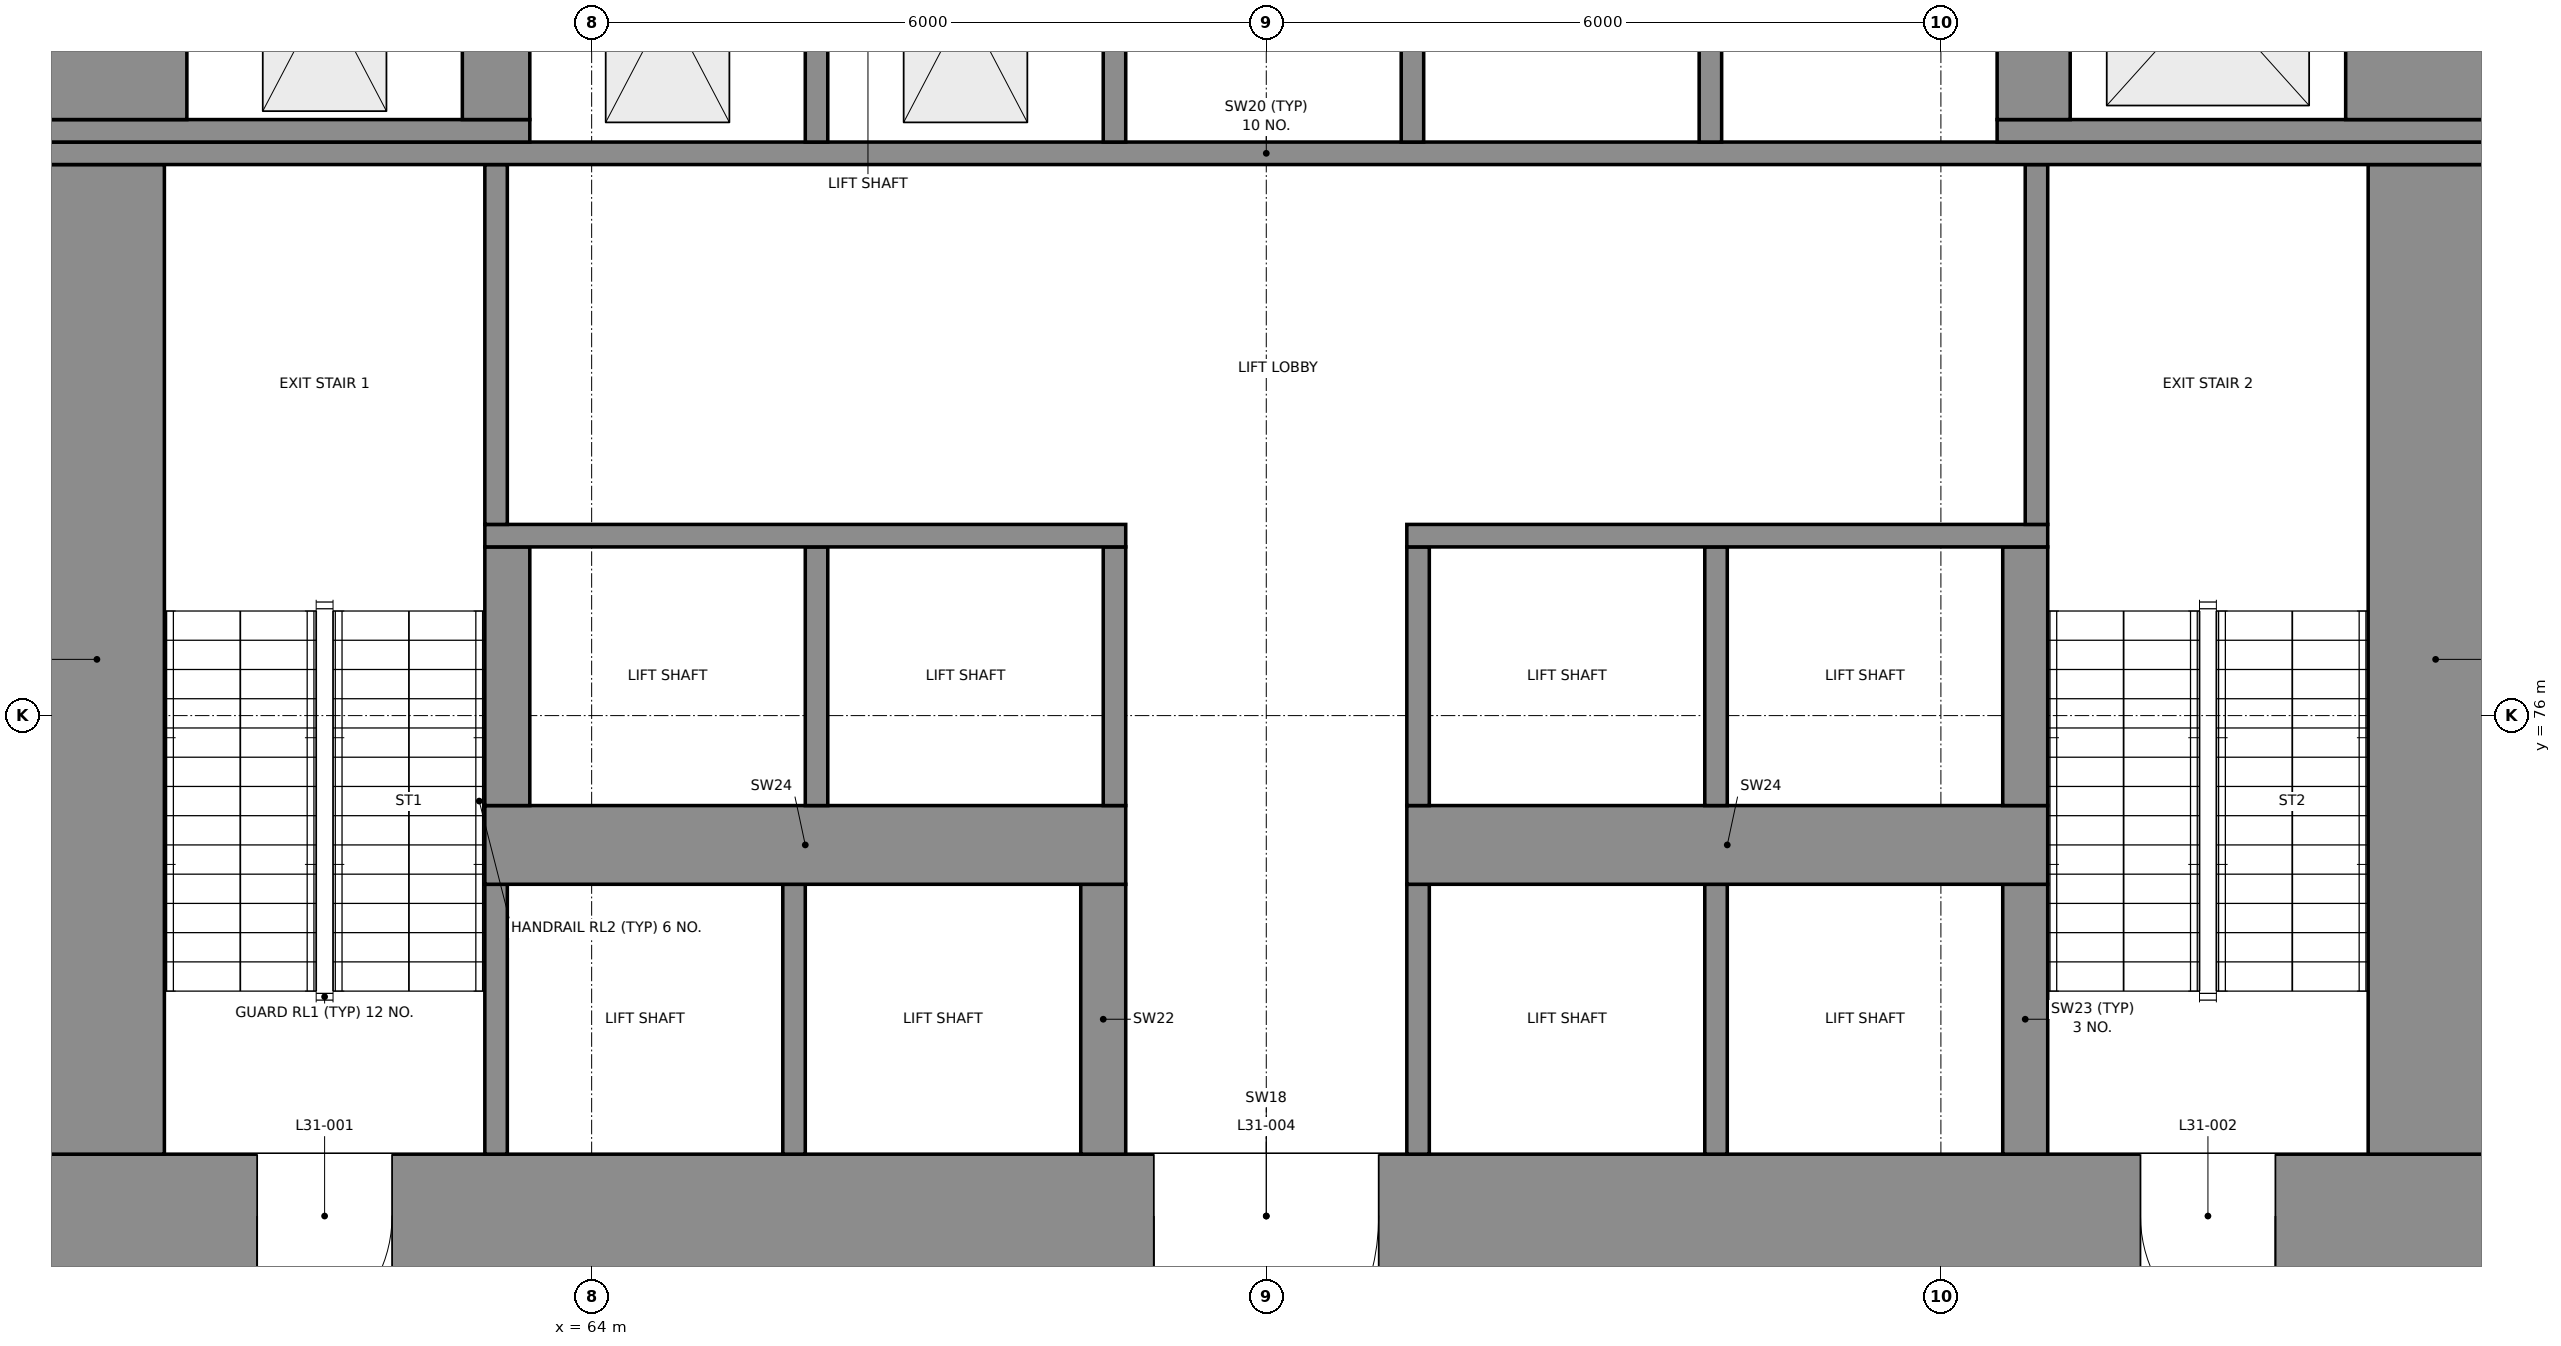
"""IFC4 building model, lengths in metres.
Left out: names, types, materials, properties, quantities, classifications, styles, units other than length and angle.
Written with IfcOpenShell. Run it as: python <this file> out.ifc"""

import sys

from ifc_helpers import new_model, si_unit, direction, frame, frame_2d, origin, place, context, subcontext, project, spatial, rectangle, extrude, element, fill, save


model = new_model("IFC4")
c1 = context("Model", 3, precision=1e-05, world=origin(), true_north=direction((0.0, 1.0)))
c2 = subcontext(c1, "Body", "Model", "MODEL_VIEW")
j1 = project(units=[si_unit("LENGTHUNIT", "METRE"), si_unit("PLANEANGLEUNIT", "RADIAN")], contexts=[c1])
p1 = place(None, origin())
s1 = spatial("IfcSite", under=j1, at=p1, CompositionType="ELEMENT")
p2 = place(p1, origin())
s2 = spatial("IfcBuilding", under=s1, at=p2, CompositionType="ELEMENT")
p3 = place(p2, frame((0.0, 0.0, 137.6)))
s3 = spatial("IfcBuildingStorey", under=s2, at=p3, CompositionType="ELEMENT", Elevation=137.6)
p4 = place(p3, frame((59.0, 71.55, 0.0), z_axis=(0.0, 0.0, 1.0), x_axis=(1.0, 0.0, 0.0)))
e1 = element("IfcWall", 1, at=p4, inside=s3, PredefinedType="SHEAR", context=c2, shape_type="SweptSolid", body=[
    extrude(rectangle(XDim=22.0, YDim=1.1, at=frame_2d((11.0, 0.0))), origin(), (0.0, 0.0, 1.0), 5.0),
])
p5 = place(p4, frame((2.025, 0.0, 0.0)))
e2 = element("IfcOpeningElement", 2, at=p5, cuts=e1, PredefinedType="OPENING", context=c2, shape_type="SweptSolid", body=[
    extrude(rectangle(XDim=1.2, YDim=2.1, at=frame_2d((0.6, 1.05))), frame((0.0, 0.56, 0.0), z_axis=(0.0, -1.0, 0.0), x_axis=(1.0, 0.0, 0.0)), (0.0, 0.0, 1.0), 1.12),
])
p6 = place(p4, frame((18.775, 0.0, 0.0)))
e3 = element("IfcOpeningElement", 3, at=p6, cuts=e1, PredefinedType="OPENING", context=c2, shape_type="SweptSolid", body=[
    extrude(rectangle(XDim=1.2, YDim=2.1, at=frame_2d((0.6, 1.05))), frame((0.0, 0.56, 0.0), z_axis=(0.0, -1.0, 0.0), x_axis=(1.0, 0.0, 0.0)), (0.0, 0.0, 1.0), 1.12),
])
p7 = place(p4, frame((10.0, 0.0, 0.0)))
e4 = element("IfcOpeningElement", 4, at=p7, cuts=e1, PredefinedType="OPENING", context=c2, shape_type="SweptSolid", body=[
    extrude(rectangle(XDim=2.0, YDim=2.1, at=frame_2d((1.0, 1.05))), frame((0.0, 0.56, 0.0), z_axis=(0.0, -1.0, 0.0), x_axis=(1.0, 0.0, 0.0)), (0.0, 0.0, 1.0), 1.12),
])
p8 = place(p3, frame((59.6, 72.1, 0.0), z_axis=(0.0, 0.0, 1.0), x_axis=(0.0, 1.0, 0.0)))
e5 = element("IfcWall", 5, at=p8, inside=s3, PredefinedType="SHEAR", context=c2, shape_type="SweptSolid", body=[
    extrude(rectangle(XDim=8.8, YDim=1.2, at=frame_2d((4.4, 0.0))), origin(), (0.0, 0.0, 1.0), 5.0),
])
for number, where, z_axis, x_axis in (
    (6, (63.15, 72.1, 0.0), (0.0, 0.0, 1.0), (0.0, 1.0, 0.0)),
    (7, (65.8, 72.1, 0.0), (0.0, 0.0, 1.0), (0.0, 1.0, 0.0)),
):
    element("IfcWall", number, at=place(p3, frame(where, z_axis=z_axis, x_axis=x_axis)), inside=s3, PredefinedType="SHEAR", context=c2, shape_type="SweptSolid", body=[
        extrude(rectangle(XDim=2.4, YDim=0.2, at=frame_2d((1.2, 0.0))), origin(), (0.0, 0.0, 1.0), 5.0),
    ])
p9 = place(p3, frame((68.55, 72.1, 0.0), z_axis=(0.0, 0.0, 1.0), x_axis=(0.0, 1.0, 0.0)))
e8 = element("IfcWall", 8, at=p9, inside=s3, PredefinedType="SHEAR", context=c2, shape_type="SweptSolid", body=[
    extrude(rectangle(XDim=2.4, YDim=0.4, at=frame_2d((1.2, 0.0))), origin(), (0.0, 0.0, 1.0), 5.0),
])
for number, where, z_axis, x_axis in (
    (9, (71.35, 72.1, 0.0), (0.0, 0.0, 1.0), (0.0, 1.0, 0.0)),
    (10, (74.0, 72.1, 0.0), (0.0, 0.0, 1.0), (0.0, 1.0, 0.0)),
):
    element("IfcWall", number, at=place(p3, frame(where, z_axis=z_axis, x_axis=x_axis)), inside=s3, PredefinedType="SHEAR", context=c2, shape_type="SweptSolid", body=[
        extrude(rectangle(XDim=2.4, YDim=0.2, at=frame_2d((1.2, 0.0))), origin(), (0.0, 0.0, 1.0), 5.0),
    ])
p10 = place(p3, frame((76.75, 72.1, 0.0), z_axis=(0.0, 0.0, 1.0), x_axis=(0.0, 1.0, 0.0)))
e11 = element("IfcWall", 11, at=p10, inside=s3, PredefinedType="SHEAR", context=c2, shape_type="SweptSolid", body=[
    extrude(rectangle(XDim=2.4, YDim=0.4, at=frame_2d((1.2, 0.0))), origin(), (0.0, 0.0, 1.0), 5.0),
])
p11 = place(p3, frame((80.4, 72.1, 0.0), z_axis=(0.0, 0.0, 1.0), x_axis=(0.0, 1.0, 0.0)))
e12 = element("IfcWall", 12, at=p11, inside=s3, PredefinedType="SHEAR", context=c2, shape_type="SweptSolid", body=[
    extrude(rectangle(XDim=8.8, YDim=1.2, at=frame_2d((4.4, 0.0))), origin(), (0.0, 0.0, 1.0), 5.0),
])
for number, where, z_axis, x_axis in (
    (13, (63.05, 74.85, 0.0), (0.0, 0.0, 1.0), (1.0, 0.0, 0.0)),
    (14, (71.25, 74.85, 0.0), (0.0, 0.0, 1.0), (1.0, 0.0, 0.0)),
):
    element("IfcWall", number, at=place(p3, frame(where, z_axis=z_axis, x_axis=x_axis)), inside=s3, PredefinedType="SHEAR", context=c2, shape_type="SweptSolid", body=[
        extrude(rectangle(XDim=5.7, YDim=0.7, at=frame_2d((2.85, 0.0))), origin(), (0.0, 0.0, 1.0), 5.0),
    ])
p12 = place(p3, frame((63.25, 75.2, 0.0), z_axis=(0.0, 0.0, 1.0), x_axis=(0.0, 1.0, 0.0)))
e15 = element("IfcWall", 15, at=p12, inside=s3, PredefinedType="SHEAR", context=c2, shape_type="SweptSolid", body=[
    extrude(rectangle(XDim=2.3, YDim=0.4, at=frame_2d((1.15, 0.0))), origin(), (0.0, 0.0, 1.0), 5.0),
])
for number, where, z_axis, x_axis in (
    (16, (66.0, 75.2, 0.0), (0.0, 0.0, 1.0), (0.0, 1.0, 0.0)),
    (17, (68.65, 75.2, 0.0), (0.0, 0.0, 1.0), (0.0, 1.0, 0.0)),
    (18, (71.35, 75.2, 0.0), (0.0, 0.0, 1.0), (0.0, 1.0, 0.0)),
    (19, (74.0, 75.2, 0.0), (0.0, 0.0, 1.0), (0.0, 1.0, 0.0)),
):
    element("IfcWall", number, at=place(p3, frame(where, z_axis=z_axis, x_axis=x_axis)), inside=s3, PredefinedType="SHEAR", context=c2, shape_type="SweptSolid", body=[
        extrude(rectangle(XDim=2.3, YDim=0.2, at=frame_2d((1.15, 0.0))), origin(), (0.0, 0.0, 1.0), 5.0),
    ])
p13 = place(p3, frame((76.75, 75.2, 0.0), z_axis=(0.0, 0.0, 1.0), x_axis=(0.0, 1.0, 0.0)))
e20 = element("IfcWall", 20, at=p13, inside=s3, PredefinedType="SHEAR", context=c2, shape_type="SweptSolid", body=[
    extrude(rectangle(XDim=2.3, YDim=0.4, at=frame_2d((1.15, 0.0))), origin(), (0.0, 0.0, 1.0), 5.0),
])
for number, where, z_axis, x_axis in (
    (21, (63.05, 77.6, 0.0), (0.0, 0.0, 1.0), (1.0, 0.0, 0.0)),
    (22, (71.25, 77.6, 0.0), (0.0, 0.0, 1.0), (1.0, 0.0, 0.0)),
):
    element("IfcWall", number, at=place(p3, frame(where, z_axis=z_axis, x_axis=x_axis)), inside=s3, PredefinedType="SHEAR", context=c2, shape_type="SweptSolid", body=[
        extrude(rectangle(XDim=5.7, YDim=0.2, at=frame_2d((2.85, 0.0))), origin(), (0.0, 0.0, 1.0), 5.0),
    ])
for number, where, z_axis, x_axis in (
    (23, (63.15, 77.7, 0.0), (0.0, 0.0, 1.0), (0.0, 1.0, 0.0)),
    (24, (76.85, 77.7, 0.0), (0.0, 0.0, 1.0), (0.0, 1.0, 0.0)),
):
    element("IfcWall", number, at=place(p3, frame(where, z_axis=z_axis, x_axis=x_axis)), inside=s3, PredefinedType="SHEAR", context=c2, shape_type="SweptSolid", body=[
        extrude(rectangle(XDim=3.2, YDim=0.2, at=frame_2d((1.6, 0.0))), origin(), (0.0, 0.0, 1.0), 5.0),
    ])
p14 = place(p3, frame((59.0, 81.0, 0.0), z_axis=(0.0, 0.0, 1.0), x_axis=(1.0, 0.0, 0.0)))
e25 = element("IfcWall", 25, at=p14, inside=s3, PredefinedType="SHEAR", context=c2, shape_type="SweptSolid", body=[
    extrude(rectangle(XDim=22.0, YDim=0.2, at=frame_2d((11.0, 0.0))), origin(), (0.0, 0.0, 1.0), 5.0),
])
p15 = place(p3, frame((59.0, 81.2, 0.0), z_axis=(0.0, 0.0, 1.0), x_axis=(1.0, 0.0, 0.0)))
e26 = element("IfcWall", 26, at=p15, inside=s3, PredefinedType="SHEAR", context=c2, shape_type="SweptSolid", body=[
    extrude(rectangle(XDim=4.45, YDim=0.2, at=frame_2d((2.225, 0.0))), origin(), (0.0, 0.0, 1.0), 5.0),
])
for number, where, z_axis, x_axis in (
    (27, (66.0, 81.1, 0.0), (0.0, 0.0, 1.0), (0.0, 1.0, 0.0)),
    (28, (68.65, 81.1, 0.0), (0.0, 0.0, 1.0), (0.0, 1.0, 0.0)),
    (29, (71.3, 81.1, 0.0), (0.0, 0.0, 1.0), (0.0, 1.0, 0.0)),
    (30, (73.95, 81.1, 0.0), (0.0, 0.0, 1.0), (0.0, 1.0, 0.0)),
):
    element("IfcWall", number, at=place(p3, frame(where, z_axis=z_axis, x_axis=x_axis)), inside=s3, PredefinedType="SHEAR", context=c2, shape_type="SweptSolid", body=[
        extrude(rectangle(XDim=2.45, YDim=0.2, at=frame_2d((1.225, 0.0))), origin(), (0.0, 0.0, 1.0), 5.0),
    ])
p16 = place(p3, frame((76.5, 81.2, 0.0), z_axis=(0.0, 0.0, 1.0), x_axis=(1.0, 0.0, 0.0)))
e31 = element("IfcWall", 31, at=p16, inside=s3, PredefinedType="SHEAR", context=c2, shape_type="SweptSolid", body=[
    extrude(rectangle(XDim=4.5, YDim=0.2, at=frame_2d((2.25, 0.0))), origin(), (0.0, 0.0, 1.0), 5.0),
])
p17 = place(p3, frame((59.7, 81.3, 0.0), z_axis=(0.0, 0.0, 1.0), x_axis=(0.0, 1.0, 0.0)))
e32 = element("IfcWall", 32, at=p17, inside=s3, PredefinedType="SHEAR", context=c2, shape_type="SweptSolid", body=[
    extrude(rectangle(XDim=2.25, YDim=1.4, at=frame_2d((1.125, 0.0))), origin(), (0.0, 0.0, 1.0), 5.0),
])
p18 = place(p3, frame((63.15, 81.3, 0.0), z_axis=(0.0, 0.0, 1.0), x_axis=(0.0, 1.0, 0.0)))
e33 = element("IfcWall", 33, at=p18, inside=s3, PredefinedType="SHEAR", context=c2, shape_type="SweptSolid", body=[
    extrude(rectangle(XDim=2.25, YDim=0.6, at=frame_2d((1.125, 0.0))), origin(), (0.0, 0.0, 1.0), 5.0),
])
p19 = place(p3, frame((76.825, 81.3, 0.0), z_axis=(0.0, 0.0, 1.0), x_axis=(0.0, 1.0, 0.0)))
e34 = element("IfcWall", 34, at=p19, inside=s3, PredefinedType="SHEAR", context=c2, shape_type="SweptSolid", body=[
    extrude(rectangle(XDim=2.25, YDim=0.65, at=frame_2d((1.125, 0.0))), origin(), (0.0, 0.0, 1.0), 5.0),
])
p20 = place(p3, frame((80.3, 81.3, 0.0), z_axis=(0.0, 0.0, 1.0), x_axis=(0.0, 1.0, 0.0)))
e35 = element("IfcWall", 35, at=p20, inside=s3, PredefinedType="SHEAR", context=c2, shape_type="SweptSolid", body=[
    extrude(rectangle(XDim=2.25, YDim=1.4, at=frame_2d((1.125, 0.0))), origin(), (0.0, 0.0, 1.0), 5.0),
])
p21 = place(p5, frame((1.2, 0.0, 0.0), z_axis=(0.0, 0.0, 1.0), x_axis=(-1.0, 0.0, 0.0)))
e36 = element("IfcDoor", 36, at=p21, inside=s3, OperationType="SINGLE_SWING_RIGHT", PredefinedType="DOOR", context=c2, shape_type="SweptSolid", body=[
    extrude(rectangle(XDim=1.2, YDim=2.1, at=frame_2d((0.6, 1.05))), frame((0.0, 0.025, 0.0), z_axis=(0.0, -1.0, 0.0), x_axis=(1.0, 0.0, 0.0)), (0.0, 0.0, 1.0), 0.05),
])
fill(e2, e36)
p22 = place(p6, frame((1.2, 0.0, 0.0), z_axis=(0.0, 0.0, 1.0), x_axis=(-1.0, 0.0, 0.0)))
e37 = element("IfcDoor", 37, at=p22, inside=s3, OperationType="SINGLE_SWING_LEFT", PredefinedType="DOOR", context=c2, shape_type="SweptSolid", body=[
    extrude(rectangle(XDim=1.2, YDim=2.1, at=frame_2d((0.6, 1.05))), frame((0.0, 0.025, 0.0), z_axis=(0.0, -1.0, 0.0), x_axis=(1.0, 0.0, 0.0)), (0.0, 0.0, 1.0), 0.05),
])
fill(e3, e37)
p23 = place(p7, frame((2.0, 0.0, 0.0), z_axis=(0.0, 0.0, 1.0), x_axis=(-1.0, 0.0, 0.0)))
e38 = element("IfcDoor", 38, at=p23, inside=s3, OperationType="DOUBLE_DOOR_SINGLE_SWING", PredefinedType="DOOR", context=c2, shape_type="SweptSolid", body=[
    extrude(rectangle(XDim=2.0, YDim=2.1, at=frame_2d((1.0, 1.05))), frame((0.0, 0.025, 0.0), z_axis=(0.0, -1.0, 0.0), x_axis=(1.0, 0.0, 0.0)), (0.0, 0.0, 1.0), 0.05),
])
fill(e4, e38)
save(model, sys.argv[1])
